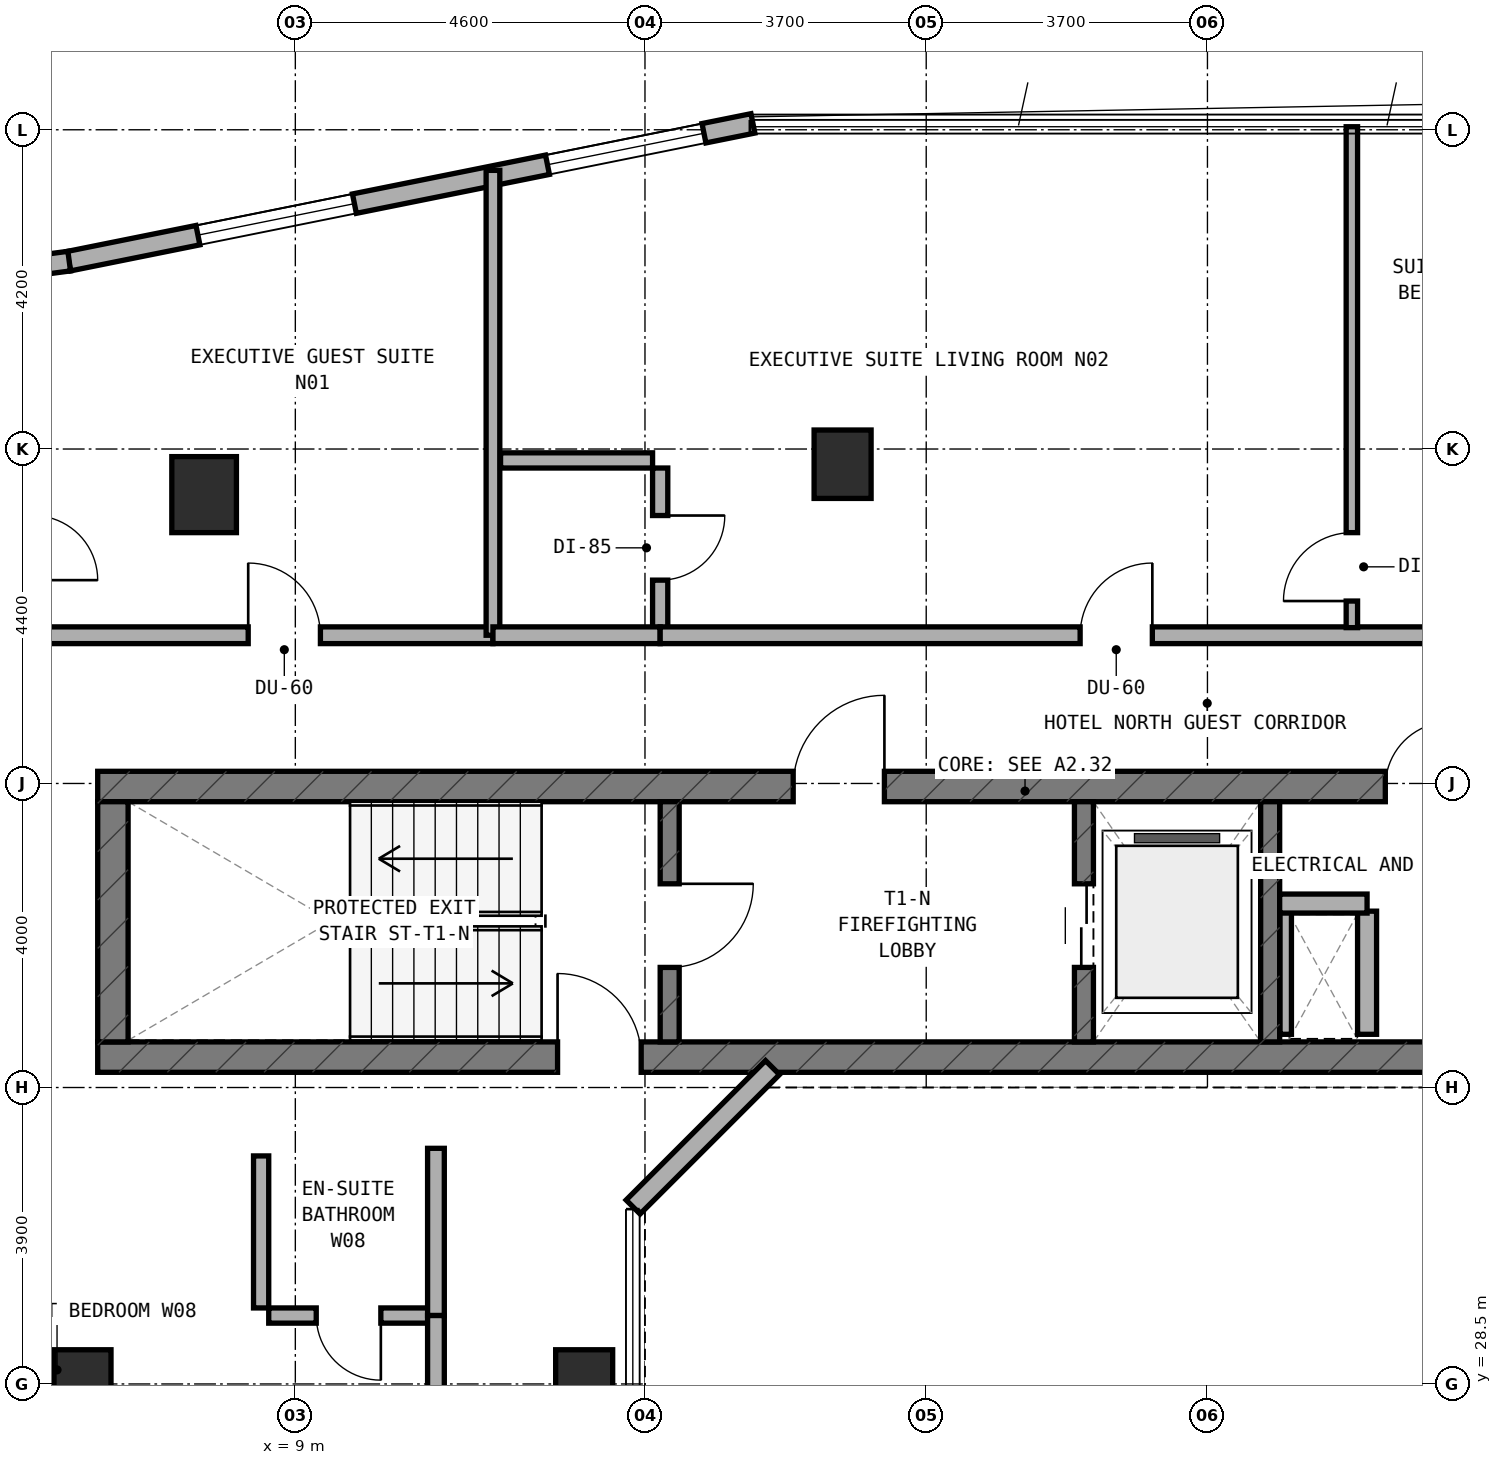
"""IFC4 building model, lengths in metres.
Left out: names, types, materials, properties, quantities, classifications, styles, units other than length and angle.
Written with IfcOpenShell. Run it as: python <this file> out.ifc"""

import sys

from ifc_helpers import new_model, si_unit, direction, frame, frame_2d, origin, origin_2d, place, context, subcontext, project, spatial, rectangle, extrude, element, fill, save


model = new_model("IFC4")
c1 = context("Model", 3, precision=1e-05, world=origin(), true_north=direction((0.0, 1.0)))
c2 = subcontext(c1, "Body", "Model", "MODEL_VIEW")
j1 = project(units=[si_unit("LENGTHUNIT", "METRE"), si_unit("PLANEANGLEUNIT", "RADIAN")], contexts=[c1])
p1 = place(None, origin())
s1 = spatial("IfcSite", under=j1, at=p1, CompositionType="ELEMENT")
p2 = place(p1, origin())
s2 = spatial("IfcBuilding", under=s1, at=p2, CompositionType="ELEMENT")
p3 = place(p2, frame((0.0, 0.0, 138.0)))
s3 = spatial("IfcBuildingStorey", under=s2, at=p3, CompositionType="ELEMENT", Elevation=138.0)
p4 = place(p3, frame((6.4, 32.8, 0.0), z_axis=(0.0, 0.0, 1.0), x_axis=(1.0, 0.0, 0.0)))
e1 = element("IfcWall", 1, at=p4, inside=s3, PredefinedType="SHEAR", context=c2, shape_type="SweptSolid", body=[
    extrude(rectangle(XDim=24.4, YDim=0.4, at=frame_2d((12.2, 0.0))), origin(), (0.0, 0.0, 1.0), 3.5),
])
p5 = place(p4, frame((6.05, 0.0, 0.0)))
e2 = element("IfcOpeningElement", 2, at=p5, cuts=e1, PredefinedType="OPENING", context=c2, shape_type="SweptSolid", body=[
    extrude(rectangle(XDim=1.1, YDim=2.15, at=frame_2d((0.55, 1.075))), frame((0.0, 0.21, 0.0), z_axis=(0.0, -1.0, 0.0), x_axis=(1.0, 0.0, 0.0)), (0.0, 0.0, 1.0), 0.42),
])
p6 = place(p3, frame((6.4, 36.36, 0.0), z_axis=(0.0, 0.0, 1.0), x_axis=(1.0, 0.0, 0.0)))
e3 = element("IfcWall", 3, at=p6, inside=s3, PredefinedType="SHEAR", context=c2, shape_type="SweptSolid", body=[
    extrude(rectangle(XDim=24.4, YDim=0.4, at=frame_2d((12.2, 0.0))), origin(), (0.0, 0.0, 1.0), 3.5),
])
p7 = place(p6, frame((9.15, 0.0, 0.0)))
e4 = element("IfcOpeningElement", 4, at=p7, cuts=e3, PredefinedType="OPENING", context=c2, shape_type="SweptSolid", body=[
    extrude(rectangle(XDim=1.2, YDim=2.15, at=frame_2d((0.6, 1.075))), frame((0.0, 0.21, 0.0), z_axis=(0.0, -1.0, 0.0), x_axis=(1.0, 0.0, 0.0)), (0.0, 0.0, 1.0), 0.42),
])
p8 = place(p6, frame((19.2, 0.0, 0.0)))
e5 = element("IfcOpeningElement", 5, at=p8, cuts=e3, PredefinedType="OPENING", context=c2, shape_type="SweptSolid", body=[
    extrude(rectangle(XDim=0.85, YDim=2.1, at=frame_2d((0.425, 1.05))), frame((0.0, 0.21, 0.0), z_axis=(0.0, -1.0, 0.0), x_axis=(1.0, 0.0, 0.0)), (0.0, 0.0, 1.0), 0.42),
])
p9 = place(p6, frame((16.94, 0.0, 0.0)))
e6 = element("IfcOpeningElement", 6, at=p9, cuts=e3, PredefinedType="OPENING", context=c2, shape_type="SweptSolid", body=[
    extrude(rectangle(XDim=0.85, YDim=2.1, at=frame_2d((0.425, 1.05))), frame((0.0, 0.21, 0.0), z_axis=(0.0, -1.0, 0.0), x_axis=(1.0, 0.0, 0.0)), (0.0, 0.0, 1.0), 0.42),
])
p10 = place(p3, frame((6.6, 33.0, 0.0), z_axis=(0.0, 0.0, 1.0), x_axis=(0.0, 1.0, 0.0)))
e7 = element("IfcWall", 7, at=p10, inside=s3, PredefinedType="SHEAR", context=c2, shape_type="SweptSolid", body=[
    extrude(rectangle(XDim=3.16, YDim=0.4, at=frame_2d((1.58, 0.0))), origin(), (0.0, 0.0, 1.0), 3.5),
])
p11 = place(p3, frame((13.925, 33.0, 0.0), z_axis=(0.0, 0.0, 1.0), x_axis=(0.0, 1.0, 0.0)))
e8 = element("IfcWall", 8, at=p11, inside=s3, PredefinedType="STANDARD", context=c2, shape_type="SweptSolid", body=[
    extrude(rectangle(XDim=3.16, YDim=0.25, at=frame_2d((1.58, 0.0))), origin(), (0.0, 0.0, 1.0), 3.22),
])
p12 = place(p11, frame((0.98, 0.0, 0.0)))
e9 = element("IfcOpeningElement", 9, at=p12, cuts=e8, PredefinedType="OPENING", context=c2, shape_type="SweptSolid", body=[
    extrude(rectangle(XDim=1.1, YDim=2.15, at=frame_2d((0.55, 1.075))), frame((0.0, 0.135, 0.0), z_axis=(0.0, -1.0, 0.0), x_axis=(1.0, 0.0, 0.0)), (0.0, 0.0, 1.0), 0.27),
])
p13 = place(p3, frame((19.375, 33.0, 0.0), z_axis=(0.0, 0.0, 1.0), x_axis=(0.0, 1.0, 0.0)))
e10 = element("IfcWall", 10, at=p13, inside=s3, PredefinedType="STANDARD", context=c2, shape_type="SweptSolid", body=[
    extrude(rectangle(XDim=3.16, YDim=0.25, at=frame_2d((1.58, 0.0))), origin(), (0.0, 0.0, 1.0), 3.22),
])
p14 = place(p13, frame((0.98, 0.0, 0.0)))
e11 = element("IfcOpeningElement", 11, at=p14, cuts=e10, PredefinedType="OPENING", context=c2, shape_type="SweptSolid", body=[
    extrude(rectangle(XDim=1.1, YDim=2.15, at=frame_2d((0.55, 1.075))), frame((0.0, 0.135, 0.0), z_axis=(0.0, -1.0, 0.0), x_axis=(1.0, 0.0, 0.0)), (0.0, 0.0, 1.0), 0.27),
])
p15 = place(p3, frame((21.825, 33.0, 0.0), z_axis=(0.0, 0.0, 1.0), x_axis=(0.0, 1.0, 0.0)))
e12 = element("IfcWall", 12, at=p15, inside=s3, PredefinedType="STANDARD", context=c2, shape_type="SweptSolid", body=[
    extrude(rectangle(XDim=3.16, YDim=0.25, at=frame_2d((1.58, 0.0))), origin(), (0.0, 0.0, 1.0), 3.22),
])
for number, where, z_axis, x_axis in (
    (13, (16.2, 40.6, 0.0), (0.0, 0.0, 1.0), (1.0, 0.0, 0.0)),
    (14, (6.2, 28.5, 0.0), (0.0, 0.0, 1.0), (1.0, 0.0, 0.0)),
):
    element("IfcColumn", number, at=place(p3, frame(where, z_axis=z_axis, x_axis=x_axis)), inside=s3, PredefinedType="COLUMN", context=c2, shape_type="SweptSolid", body=[
        extrude(rectangle(XDim=0.75, YDim=0.9, at=origin_2d()), origin(), (0.0, 0.0, 1.0), 3.5),
    ])
p16 = place(p3, frame((7.8, 40.2, 0.0), z_axis=(0.0, 0.0, 1.0), x_axis=(1.0, 0.0, 0.0)))
e15 = element("IfcColumn", 15, at=p16, inside=s3, PredefinedType="COLUMN", context=c2, shape_type="SweptSolid", body=[
    extrude(rectangle(XDim=0.85, YDim=1.0, at=origin_2d()), origin(), (0.0, 0.0, 1.0), 3.5),
])
p17 = place(p3, frame((12.8, 28.5, 0.0), z_axis=(0.0, 0.0, 1.0), x_axis=(1.0, 0.0, 0.0)))
e16 = element("IfcColumn", 16, at=p17, inside=s3, PredefinedType="COLUMN", context=c2, shape_type="SweptSolid", body=[
    extrude(rectangle(XDim=0.75, YDim=0.9, at=origin_2d()), origin(), (0.0, 0.0, 1.0), 3.5),
])
p18 = place(p3, frame((15.02, 45.084, 0.0), z_axis=(0.0, 0.0, 1.0), x_axis=(-0.980315963543, -0.197435082048, 0.0)))
e17 = element("IfcWall", 17, at=p18, inside=s3, PredefinedType="STANDARD", context=c2, shape_type="SweptSolid", body=[
    extrude(rectangle(XDim=9.183, YDim=0.26, at=frame_2d((4.591, 0.0))), origin(), (0.0, 0.0, 1.0), 3.22),
])
p19 = place(p18, frame((0.657, 0.0, 0.85)))
e18 = element("IfcOpeningElement", 18, at=p19, cuts=e17, PredefinedType="OPENING", context=c2, shape_type="SweptSolid", body=[
    extrude(rectangle(XDim=2.1, YDim=1.5, at=frame_2d((1.05, 0.75))), frame((0.0, 0.14, 0.0), z_axis=(0.0, -1.0, 0.0), x_axis=(1.0, 0.0, 0.0)), (0.0, 0.0, 1.0), 0.28),
])
p20 = place(p18, frame((5.348, 0.0, 0.85)))
e19 = element("IfcOpeningElement", 19, at=p20, cuts=e17, PredefinedType="OPENING", context=c2, shape_type="SweptSolid", body=[
    extrude(rectangle(XDim=2.1, YDim=1.5, at=frame_2d((1.05, 0.75))), frame((0.0, 0.14, 0.0), z_axis=(0.0, -1.0, 0.0), x_axis=(1.0, 0.0, 0.0)), (0.0, 0.0, 1.0), 0.28),
])
p21 = place(p3, frame((6.025, 43.272, 0.0), z_axis=(0.0, 0.0, 1.0), x_axis=(-0.991388484223, -0.130953706898, 0.0)))
e20 = element("IfcWall", 20, at=p21, inside=s3, PredefinedType="STANDARD", context=c2, shape_type="SweptSolid", body=[
    extrude(rectangle(XDim=0.885, YDim=0.26, at=frame_2d((0.443, 0.0))), origin(), (0.0, 0.0, 1.0), 3.22),
])
p22 = place(p3, frame((15.278, 32.662, 0.0), z_axis=(0.0, 0.0, 1.0), x_axis=(-0.707059717605, -0.707153841636, 0.0)))
e21 = element("IfcWall", 21, at=p22, inside=s3, PredefinedType="STANDARD", context=c2, shape_type="SweptSolid", body=[
    extrude(rectangle(XDim=2.594, YDim=0.26, at=frame_2d((1.297, 0.0))), origin(), (0.0, 0.0, 1.0), 3.22),
])
p23 = place(p3, frame((22.03, 33.1, 0.0), z_axis=(0.0, 0.0, 1.0), x_axis=(0.0, 1.0, 0.0)))
e22 = element("IfcWall", 22, at=p23, inside=s3, PredefinedType="PARTITIONING", context=c2, shape_type="SweptSolid", body=[
    extrude(rectangle(XDim=1.62, YDim=0.15, at=frame_2d((0.81, 0.0))), origin(), (0.0, 0.0, 1.0), 3.22),
])
p24 = place(p3, frame((23.1, 33.1, 0.0), z_axis=(0.0, 0.0, 1.0), x_axis=(0.0, 1.0, 0.0)))
e23 = element("IfcWall", 23, at=p24, inside=s3, PredefinedType="SOLIDWALL", context=c2, shape_type="SweptSolid", body=[
    extrude(rectangle(XDim=1.62, YDim=0.25, at=frame_2d((0.81, 0.0))), origin(), (0.0, 0.0, 1.0), 3.22),
])
p25 = place(p3, frame((21.95, 34.82, 0.0), z_axis=(0.0, 0.0, 1.0), x_axis=(1.0, 0.0, 0.0)))
e24 = element("IfcWall", 24, at=p25, inside=s3, PredefinedType="SOLIDWALL", context=c2, shape_type="SweptSolid", body=[
    extrude(rectangle(XDim=1.15, YDim=0.25, at=frame_2d((0.575, 0.0))), origin(), (0.0, 0.0, 1.0), 3.22),
])
p26 = place(p3, frame((5.55, 38.35, 0.0), z_axis=(0.0, 0.0, 1.0), x_axis=(1.0, 0.0, 0.0)))
e25 = element("IfcWall", 25, at=p26, inside=s3, PredefinedType="SOLIDWALL", context=c2, shape_type="SweptSolid", body=[
    extrude(rectangle(XDim=6.05, YDim=0.22, at=frame_2d((3.025, 0.0))), origin(), (0.0, 0.0, 1.0), 2.695),
])
p27 = place(p26, frame((2.83, 0.0, 0.0)))
e26 = element("IfcOpeningElement", 26, at=p27, cuts=e25, PredefinedType="OPENING", context=c2, shape_type="SweptSolid", body=[
    extrude(rectangle(XDim=0.95, YDim=2.1, at=frame_2d((0.475, 1.05))), frame((0.0, 0.12, 0.0), z_axis=(0.0, -1.0, 0.0), x_axis=(1.0, 0.0, 0.0)), (0.0, 0.0, 1.0), 0.24),
])
p28 = place(p3, frame((11.6, 38.35, 0.0), z_axis=(0.0, 0.0, 1.0), x_axis=(0.0, 1.0, 0.0)))
e27 = element("IfcWall", 27, at=p28, inside=s3, PredefinedType="SOLIDWALL", context=c2, shape_type="SweptSolid", body=[
    extrude(rectangle(XDim=6.116, YDim=0.18, at=frame_2d((3.058, 0.0))), origin(), (0.0, 0.0, 1.0), 2.835),
])
p29 = place(p3, frame((13.8, 38.45, 0.0), z_axis=(0.0, 0.0, 1.0), x_axis=(0.0, 1.0, 0.0)))
e28 = element("IfcWall", 28, at=p29, inside=s3, PredefinedType="PLUMBINGWALL", context=c2, shape_type="SweptSolid", body=[
    extrude(rectangle(XDim=2.1, YDim=0.2, at=frame_2d((1.05, 0.0))), origin(), (0.0, 0.0, 1.0), 2.835),
])
p30 = place(p29, frame((0.625, 0.0, 0.0)))
e29 = element("IfcOpeningElement", 29, at=p30, cuts=e28, PredefinedType="OPENING", context=c2, shape_type="SweptSolid", body=[
    extrude(rectangle(XDim=0.85, YDim=2.1, at=frame_2d((0.425, 1.05))), frame((0.0, 0.11, 0.0), z_axis=(0.0, -1.0, 0.0), x_axis=(1.0, 0.0, 0.0)), (0.0, 0.0, 1.0), 0.22),
])
p31 = place(p3, frame((11.7, 40.65, 0.0), z_axis=(0.0, 0.0, 1.0), x_axis=(1.0, 0.0, 0.0)))
e30 = element("IfcWall", 30, at=p31, inside=s3, PredefinedType="PLUMBINGWALL", context=c2, shape_type="SweptSolid", body=[
    extrude(rectangle(XDim=2.0, YDim=0.2, at=frame_2d((1.0, 0.0))), origin(), (0.0, 0.0, 1.0), 2.835),
])
p32 = place(p3, frame((11.6, 38.35, 0.0), z_axis=(0.0, 0.0, 1.0), x_axis=(1.0, 0.0, 0.0)))
e31 = element("IfcWall", 31, at=p32, inside=s3, PredefinedType="SOLIDWALL", context=c2, shape_type="SweptSolid", body=[
    extrude(rectangle(XDim=2.2, YDim=0.22, at=frame_2d((1.1, 0.0))), origin(), (0.0, 0.0, 1.0), 3.22),
])
p33 = place(p3, frame((13.8, 38.35, 0.0), z_axis=(0.0, 0.0, 1.0), x_axis=(1.0, 0.0, 0.0)))
e32 = element("IfcWall", 32, at=p33, inside=s3, PredefinedType="SOLIDWALL", context=c2, shape_type="SweptSolid", body=[
    extrude(rectangle(XDim=12.0, YDim=0.22, at=frame_2d((6.0, 0.0))), origin(), (0.0, 0.0, 1.0), 2.695),
])
p34 = place(p33, frame((5.525, 0.0, 0.0)))
e33 = element("IfcOpeningElement", 33, at=p34, cuts=e32, PredefinedType="OPENING", context=c2, shape_type="SweptSolid", body=[
    extrude(rectangle(XDim=0.95, YDim=2.1, at=frame_2d((0.475, 1.05))), frame((0.0, 0.12, 0.0), z_axis=(0.0, -1.0, 0.0), x_axis=(1.0, 0.0, 0.0)), (0.0, 0.0, 1.0), 0.24),
])
p35 = place(p3, frame((22.9, 38.45, 0.0), z_axis=(0.0, 0.0, 1.0), x_axis=(0.0, 1.0, 0.0)))
e34 = element("IfcWall", 34, at=p35, inside=s3, PredefinedType="PARTITIONING", context=c2, shape_type="SweptSolid", body=[
    extrude(rectangle(XDim=6.59, YDim=0.15, at=frame_2d((3.295, 0.0))), origin(), (0.0, 0.0, 1.0), 2.835),
])
p36 = place(p35, frame((0.35, 0.0, 0.0)))
e35 = element("IfcOpeningElement", 35, at=p36, cuts=e34, PredefinedType="OPENING", context=c2, shape_type="SweptSolid", body=[
    extrude(rectangle(XDim=0.9, YDim=2.1, at=frame_2d((0.45, 1.05))), frame((0.0, 0.085, 0.0), z_axis=(0.0, -1.0, 0.0), x_axis=(1.0, 0.0, 0.0)), (0.0, 0.0, 1.0), 0.17),
])
p37 = place(p3, frame((8.65, 29.4, 0.0), z_axis=(0.0, 0.0, 1.0), x_axis=(1.0, 0.0, 0.0)))
e36 = element("IfcWall", 36, at=p37, inside=s3, PredefinedType="PLUMBINGWALL", context=c2, shape_type="SweptSolid", body=[
    extrude(rectangle(XDim=2.1, YDim=0.2, at=frame_2d((1.05, 0.0))), origin(), (0.0, 0.0, 1.0), 3.22),
])
p38 = place(p37, frame((0.625, 0.0, 0.0)))
e37 = element("IfcOpeningElement", 37, at=p38, cuts=e36, PredefinedType="OPENING", context=c2, shape_type="SweptSolid", body=[
    extrude(rectangle(XDim=0.85, YDim=2.1, at=frame_2d((0.425, 1.05))), frame((0.0, 0.11, 0.0), z_axis=(0.0, -1.0, 0.0), x_axis=(1.0, 0.0, 0.0)), (0.0, 0.0, 1.0), 0.22),
])
p39 = place(p3, frame((8.55, 29.5, 0.0), z_axis=(0.0, 0.0, 1.0), x_axis=(0.0, 1.0, 0.0)))
e38 = element("IfcWall", 38, at=p39, inside=s3, PredefinedType="PLUMBINGWALL", context=c2, shape_type="SweptSolid", body=[
    extrude(rectangle(XDim=2.0, YDim=0.2, at=frame_2d((1.0, 0.0))), origin(), (0.0, 0.0, 1.0), 3.22),
])
p40 = place(p3, frame((10.85, 29.4, 0.0), z_axis=(0.0, 0.0, 1.0), x_axis=(0.0, 1.0, 0.0)))
e39 = element("IfcWall", 39, at=p40, inside=s3, PredefinedType="SOLIDWALL", context=c2, shape_type="SweptSolid", body=[
    extrude(rectangle(XDim=2.2, YDim=0.22, at=frame_2d((1.1, 0.0))), origin(), (0.0, 0.0, 1.0), 3.22),
])
p41 = place(p3, frame((10.85, 25.77, 0.0), z_axis=(0.0, 0.0, 1.0), x_axis=(0.0, 1.0, 0.0)))
e40 = element("IfcWall", 40, at=p41, inside=s3, PredefinedType="SOLIDWALL", context=c2, shape_type="SweptSolid", body=[
    extrude(rectangle(XDim=3.63, YDim=0.22, at=frame_2d((1.815, 0.0))), origin(), (0.0, 0.0, 1.0), 2.695),
])
p42 = place(p41, frame((1.34, 0.0, 0.0)))
e41 = element("IfcOpeningElement", 41, at=p42, cuts=e40, PredefinedType="OPENING", context=c2, shape_type="SweptSolid", body=[
    extrude(rectangle(XDim=0.95, YDim=2.1, at=frame_2d((0.475, 1.05))), frame((0.0, 0.12, 0.0), z_axis=(0.0, -1.0, 0.0), x_axis=(1.0, 0.0, 0.0)), (0.0, 0.0, 1.0), 0.24),
])
p43 = place(p19, origin())
e42 = element("IfcWindow", 42, at=p43, inside=s3, PartitioningType="SINGLE_PANEL", PredefinedType="WINDOW", context=c2, shape_type="SweptSolid", body=[
    extrude(rectangle(XDim=2.1, YDim=1.5, at=frame_2d((1.05, 0.75))), frame((0.0, 0.03, 0.0), z_axis=(0.0, -1.0, 0.0), x_axis=(1.0, 0.0, 0.0)), (0.0, 0.0, 1.0), 0.06),
])
fill(e18, e42)
p44 = place(p20, origin())
e43 = element("IfcWindow", 43, at=p44, inside=s3, PartitioningType="SINGLE_PANEL", PredefinedType="WINDOW", context=c2, shape_type="SweptSolid", body=[
    extrude(rectangle(XDim=2.1, YDim=1.5, at=frame_2d((1.05, 0.75))), frame((0.0, 0.03, 0.0), z_axis=(0.0, -1.0, 0.0), x_axis=(1.0, 0.0, 0.0)), (0.0, 0.0, 1.0), 0.06),
])
fill(e19, e43)
p45 = place(p12, frame((1.1, 0.0, 0.0), z_axis=(0.0, 0.0, 1.0), x_axis=(-1.0, 0.0, 0.0)))
e44 = element("IfcDoor", 44, at=p45, inside=s3, OperationType="SINGLE_SWING_LEFT", PredefinedType="DOOR", context=c2, shape_type="SweptSolid", body=[
    extrude(rectangle(XDim=1.1, YDim=2.15, at=frame_2d((0.55, 1.075))), frame((0.0, 0.025, 0.0), z_axis=(0.0, -1.0, 0.0), x_axis=(1.0, 0.0, 0.0)), (0.0, 0.0, 1.0), 0.05),
])
fill(e9, e44)
p46 = place(p7, origin())
e45 = element("IfcDoor", 45, at=p46, inside=s3, OperationType="SINGLE_SWING_RIGHT", PredefinedType="DOOR", context=c2, shape_type="SweptSolid", body=[
    extrude(rectangle(XDim=1.2, YDim=2.15, at=frame_2d((0.6, 1.075))), frame((0.0, 0.025, 0.0), z_axis=(0.0, -1.0, 0.0), x_axis=(1.0, 0.0, 0.0)), (0.0, 0.0, 1.0), 0.05),
])
fill(e4, e45)
p47 = place(p14, origin())
e46 = element("IfcDoor", 46, at=p47, inside=s3, OperationType="DOUBLE_DOOR_SLIDING", PredefinedType="DOOR", context=c2, shape_type="SweptSolid", body=[
    extrude(rectangle(XDim=1.1, YDim=2.15, at=frame_2d((0.55, 1.075))), frame((0.0, 0.025, 0.0), z_axis=(0.0, -1.0, 0.0), x_axis=(1.0, 0.0, 0.0)), (0.0, 0.0, 1.0), 0.05),
])
fill(e11, e46)
p48 = place(p9, origin())
e47 = element("IfcDoor", 47, at=p48, inside=s3, OperationType="SINGLE_SWING_RIGHT", PredefinedType="DOOR", context=c2, shape_type="SweptSolid", body=[
    extrude(rectangle(XDim=0.85, YDim=2.1, at=frame_2d((0.425, 1.05))), frame((0.0, 0.025, 0.0), z_axis=(0.0, -1.0, 0.0), x_axis=(1.0, 0.0, 0.0)), (0.0, 0.0, 1.0), 0.05),
])
fill(e6, e47)
p49 = place(p5, origin())
e48 = element("IfcDoor", 48, at=p49, inside=s3, OperationType="SINGLE_SWING_LEFT", PredefinedType="DOOR", context=c2, shape_type="SweptSolid", body=[
    extrude(rectangle(XDim=1.1, YDim=2.15, at=frame_2d((0.55, 1.075))), frame((0.0, 0.025, 0.0), z_axis=(0.0, -1.0, 0.0), x_axis=(1.0, 0.0, 0.0)), (0.0, 0.0, 1.0), 0.05),
])
fill(e2, e48)
p50 = place(p27, origin())
e49 = element("IfcDoor", 49, at=p50, inside=s3, OperationType="SINGLE_SWING_LEFT", PredefinedType="DOOR", context=c2, shape_type="SweptSolid", body=[
    extrude(rectangle(XDim=0.95, YDim=2.1, at=frame_2d((0.475, 1.05))), frame((0.0, 0.025, 0.0), z_axis=(0.0, -1.0, 0.0), x_axis=(1.0, 0.0, 0.0)), (0.0, 0.0, 1.0), 0.05),
])
fill(e26, e49)
p51 = place(p30, frame((0.85, 0.0, 0.0), z_axis=(0.0, 0.0, 1.0), x_axis=(-1.0, 0.0, 0.0)))
e50 = element("IfcDoor", 50, at=p51, inside=s3, OperationType="SINGLE_SWING_LEFT", PredefinedType="DOOR", context=c2, shape_type="SweptSolid", body=[
    extrude(rectangle(XDim=0.85, YDim=2.1, at=frame_2d((0.425, 1.05))), frame((0.0, 0.025, 0.0), z_axis=(0.0, -1.0, 0.0), x_axis=(1.0, 0.0, 0.0)), (0.0, 0.0, 1.0), 0.05),
])
fill(e29, e50)
p52 = place(p34, origin())
e51 = element("IfcDoor", 51, at=p52, inside=s3, OperationType="SINGLE_SWING_RIGHT", PredefinedType="DOOR", context=c2, shape_type="SweptSolid", body=[
    extrude(rectangle(XDim=0.95, YDim=2.1, at=frame_2d((0.475, 1.05))), frame((0.0, 0.025, 0.0), z_axis=(0.0, -1.0, 0.0), x_axis=(1.0, 0.0, 0.0)), (0.0, 0.0, 1.0), 0.05),
])
fill(e33, e51)
p53 = place(p36, origin())
e52 = element("IfcDoor", 52, at=p53, inside=s3, OperationType="SINGLE_SWING_LEFT", PredefinedType="DOOR", context=c2, shape_type="SweptSolid", body=[
    extrude(rectangle(XDim=0.9, YDim=2.1, at=frame_2d((0.45, 1.05))), frame((0.0, 0.025, 0.0), z_axis=(0.0, -1.0, 0.0), x_axis=(1.0, 0.0, 0.0)), (0.0, 0.0, 1.0), 0.05),
])
fill(e35, e52)
p54 = place(p38, frame((0.85, 0.0, 0.0), z_axis=(0.0, 0.0, 1.0), x_axis=(-1.0, 0.0, 0.0)))
e53 = element("IfcDoor", 53, at=p54, inside=s3, OperationType="SINGLE_SWING_LEFT", PredefinedType="DOOR", context=c2, shape_type="SweptSolid", body=[
    extrude(rectangle(XDim=0.85, YDim=2.1, at=frame_2d((0.425, 1.05))), frame((0.0, 0.025, 0.0), z_axis=(0.0, -1.0, 0.0), x_axis=(1.0, 0.0, 0.0)), (0.0, 0.0, 1.0), 0.05),
])
fill(e37, e53)
save(model, sys.argv[1])
